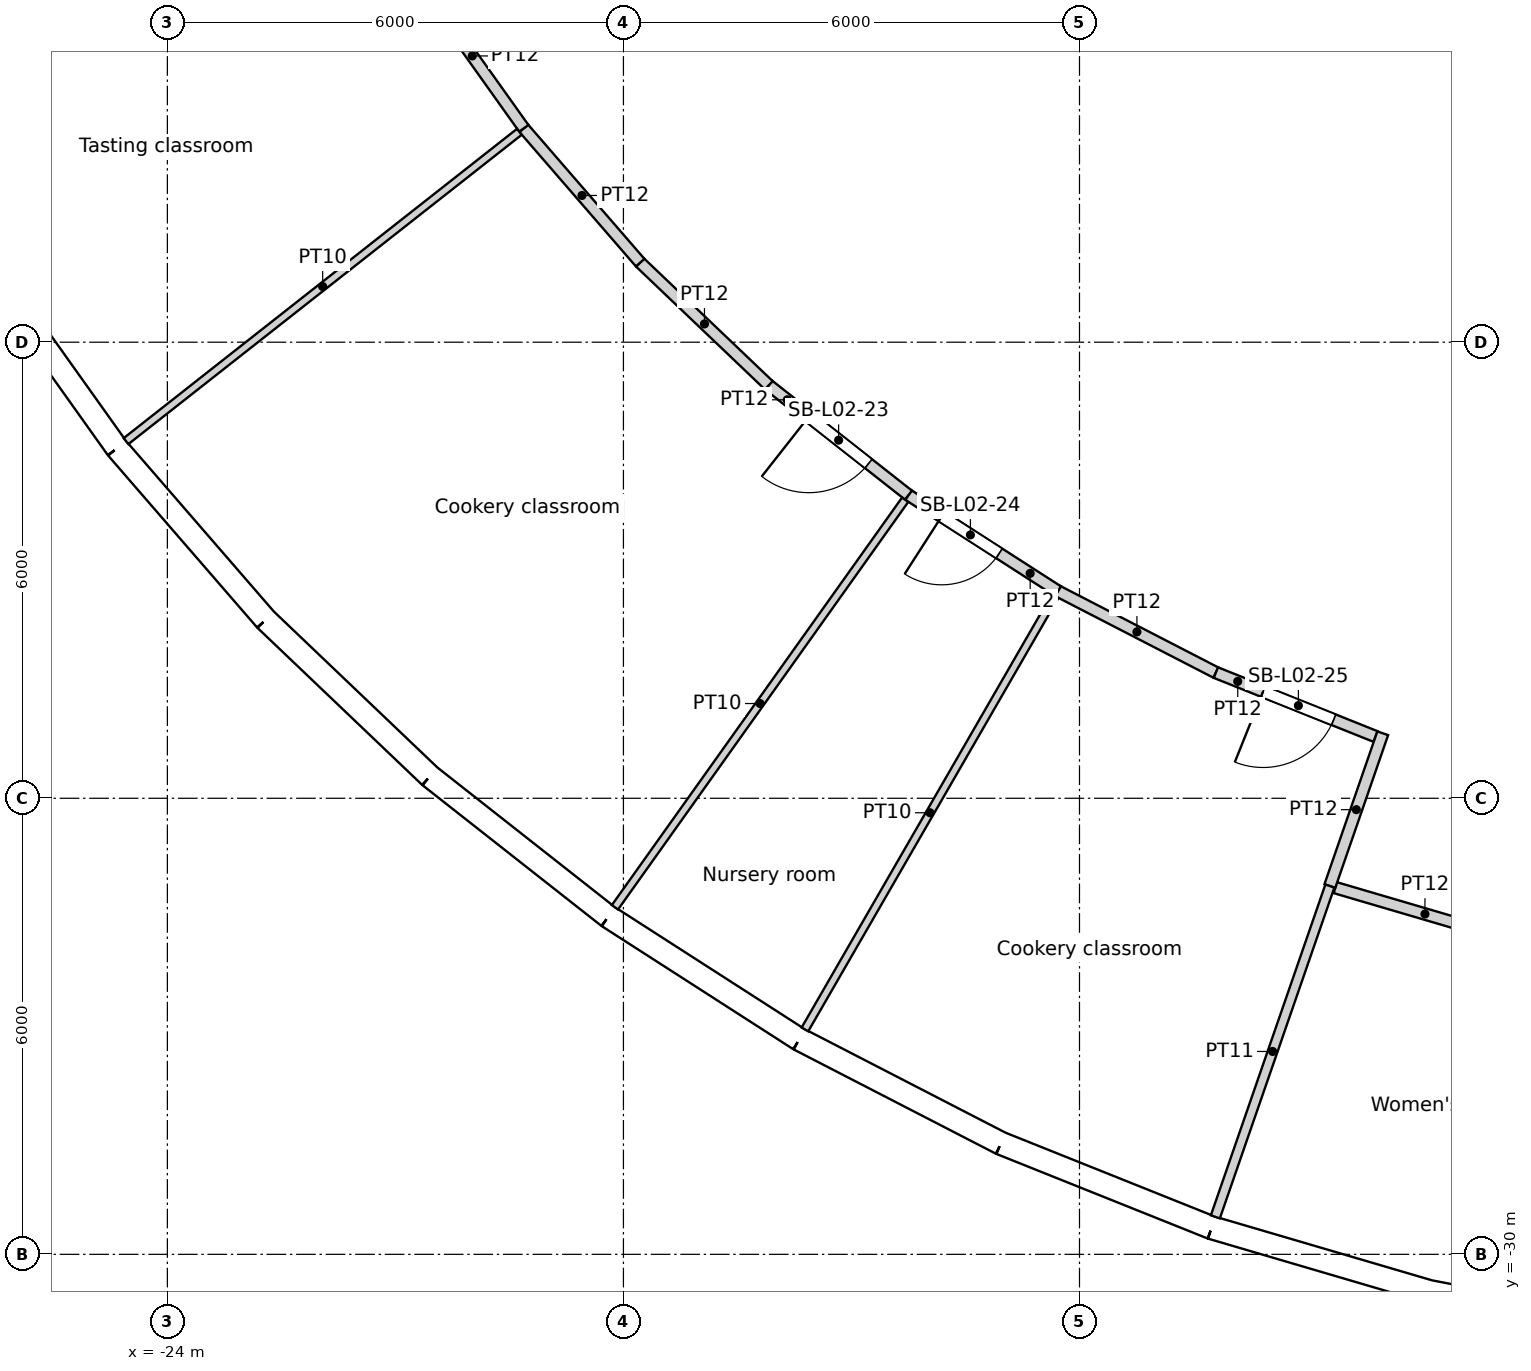
"""IFC4 building model, lengths in metres.
Left out: names, types, materials, properties, quantities, classifications, styles, units other than length and angle.
Written with IfcOpenShell. Run it as: python <this file> out.ifc"""

import sys

from ifc_helpers import new_model, si_unit, direction, frame, frame_2d, origin, origin_2d, place, context, subcontext, project, spatial, rectangle, circle, extrude, element, fill, save


model = new_model("IFC4")
c1 = context("Model", 3, precision=1e-05, world=origin(), true_north=direction((0.0, 1.0)))
c2 = subcontext(c1, "Body", "Model", "MODEL_VIEW")
j1 = project(units=[si_unit("LENGTHUNIT", "METRE"), si_unit("PLANEANGLEUNIT", "RADIAN")], contexts=[c1])
p1 = place(None, origin())
s1 = spatial("IfcSite", under=j1, at=p1, CompositionType="ELEMENT")
p2 = place(p1, origin())
s2 = spatial("IfcBuilding", under=s1, at=p2, CompositionType="ELEMENT")
p3 = place(p2, frame((0.0, 0.0, 13.8)))
s3 = spatial("IfcBuildingStorey", under=s2, at=p3, CompositionType="ELEMENT", Elevation=13.8)
for number, where, z_axis, x_axis in (
    (1, (-23.797, -18.715, 0.0), (0.0, 0.0, 1.0), (1.0, 0.0, 0.0)),
    (2, (-19.826, -22.88, 0.0), (0.0, 0.0, 1.0), (1.0, 0.0, 0.0)),
    (3, (-15.137, -26.219, 0.0), (0.0, 0.0, 1.0), (1.0, 0.0, 0.0)),
    (4, (-9.902, -28.61, 0.0), (0.0, 0.0, 1.0), (1.0, 0.0, 0.0)),
):
    element("IfcColumn", number, at=place(p3, frame(where, z_axis=z_axis, x_axis=x_axis)), inside=s3, PredefinedType="COLUMN", context=c2, shape_type="SweptSolid", body=[
        extrude(circle(Radius=0.7, at=origin_2d()), origin(), (0.0, 0.0, 1.0), 4.8),
    ])
for number, where, z_axis, x_axis in (
    (5, (-20.509, -13.489, 0.0), (0.0, 0.0, 1.0), (1.0, 0.0, 0.0)),
    (6, (-16.846, -17.855, 0.0), (0.0, 0.0, 1.0), (1.0, 0.0, 0.0)),
    (7, (-12.274, -21.259, 0.0), (0.0, 0.0, 1.0), (1.0, 0.0, 0.0)),
    (8, (-7.04, -23.516, 0.0), (0.0, 0.0, 1.0), (1.0, 0.0, 0.0)),
):
    element("IfcColumn", number, at=place(p3, frame(where, z_axis=z_axis, x_axis=x_axis)), inside=s3, PredefinedType="COLUMN", context=c2, shape_type="SweptSolid", body=[
        extrude(circle(Radius=0.75, at=origin_2d()), origin(), (0.0, 0.0, 1.0), 4.8),
    ])
p4 = place(p3, frame((-9.411, -16.301, 0.0), z_axis=(0.0, 0.0, 1.0), x_axis=(1.0, 0.0, 0.0)))
e9 = element("IfcColumn", 9, at=p4, inside=s3, PredefinedType="COLUMN", context=c2, shape_type="SweptSolid", body=[
    extrude(circle(Radius=0.8, at=origin_2d()), origin(), (0.0, 0.0, 1.0), 4.8),
])
p5 = place(p3, frame((-26.394, -16.962, 0.0), z_axis=(0.0, 0.0, 1.0), x_axis=(0.580100533892, -0.814544885551, 0.0)))
e10 = element("IfcWall", 10, at=p5, inside=s3, PredefinedType="SOLIDWALL", context=c2, shape_type="SweptSolid", body=[
    extrude(rectangle(XDim=2.986, YDim=0.3, at=frame_2d((1.493, 0.0))), origin(), (0.0, 0.0, 1.0), 4.35),
])
p6 = place(p5, frame((1.493, 0.0, 2.0)))
e11 = element("IfcOpeningElement", 11, at=p6, cuts=e10, PredefinedType="OPENING", context=c2, shape_type="SweptSolid", body=[
    extrude(circle(Radius=1.2, at=origin_2d()), frame((0.0, 0.16, 0.0), z_axis=(0.0, -1.0, 0.0), x_axis=(1.0, 0.0, 0.0)), (0.0, 0.0, 1.0), 0.32),
])
p7 = place(p3, frame((-24.662, -19.394, 0.0), z_axis=(0.0, 0.0, 1.0), x_axis=(0.654809121128, -0.755794294029, 0.0)))
e12 = element("IfcWall", 12, at=p7, inside=s3, PredefinedType="SOLIDWALL", context=c2, shape_type="SweptSolid", body=[
    extrude(rectangle(XDim=2.986, YDim=0.3, at=frame_2d((1.493, 0.0))), origin(), (0.0, 0.0, 1.0), 4.35),
])
p8 = place(p7, frame((1.493, 0.0, 2.0)))
e13 = element("IfcOpeningElement", 13, at=p8, cuts=e12, PredefinedType="OPENING", context=c2, shape_type="SweptSolid", body=[
    extrude(circle(Radius=1.2, at=origin_2d()), frame((0.0, 0.16, 0.0), z_axis=(0.0, -1.0, 0.0), x_axis=(1.0, 0.0, 0.0)), (0.0, 0.0, 1.0), 0.32),
])
p9 = place(p3, frame((-22.707, -21.651, 0.0), z_axis=(0.0, 0.0, 1.0), x_axis=(0.723750841228, -0.690061388444, 0.0)))
e14 = element("IfcWall", 14, at=p9, inside=s3, PredefinedType="SOLIDWALL", context=c2, shape_type="SweptSolid", body=[
    extrude(rectangle(XDim=2.986, YDim=0.3, at=frame_2d((1.493, 0.0))), origin(), (0.0, 0.0, 1.0), 4.35),
])
p10 = place(p9, frame((1.493, 0.0, 2.0)))
e15 = element("IfcOpeningElement", 15, at=p10, cuts=e14, PredefinedType="OPENING", context=c2, shape_type="SweptSolid", body=[
    extrude(circle(Radius=1.2, at=origin_2d()), frame((0.0, 0.16, 0.0), z_axis=(0.0, -1.0, 0.0), x_axis=(1.0, 0.0, 0.0)), (0.0, 0.0, 1.0), 0.32),
])
p11 = place(p3, frame((-20.546, -23.711, 0.0), z_axis=(0.0, 0.0, 1.0), x_axis=(0.786043032847, -0.618171780747, 0.0)))
e16 = element("IfcWall", 16, at=p11, inside=s3, PredefinedType="SOLIDWALL", context=c2, shape_type="SweptSolid", body=[
    extrude(rectangle(XDim=2.986, YDim=0.3, at=frame_2d((1.493, 0.0))), origin(), (0.0, 0.0, 1.0), 4.35),
])
p12 = place(p11, frame((1.493, 0.0, 2.0)))
e17 = element("IfcOpeningElement", 17, at=p12, cuts=e16, PredefinedType="OPENING", context=c2, shape_type="SweptSolid", body=[
    extrude(circle(Radius=1.2, at=origin_2d()), frame((0.0, 0.16, 0.0), z_axis=(0.0, -1.0, 0.0), x_axis=(1.0, 0.0, 0.0)), (0.0, 0.0, 1.0), 0.32),
])
p13 = place(p3, frame((-18.199, -25.557, 0.0), z_axis=(0.0, 0.0, 1.0), x_axis=(0.841242231846, -0.540658401727, 0.0)))
e18 = element("IfcWall", 18, at=p13, inside=s3, PredefinedType="SOLIDWALL", context=c2, shape_type="SweptSolid", body=[
    extrude(rectangle(XDim=2.986, YDim=0.3, at=frame_2d((1.493, 0.0))), origin(), (0.0, 0.0, 1.0), 4.35),
])
p14 = place(p13, frame((1.493, 0.0, 2.0)))
e19 = element("IfcOpeningElement", 19, at=p14, cuts=e18, PredefinedType="OPENING", context=c2, shape_type="SweptSolid", body=[
    extrude(circle(Radius=1.2, at=origin_2d()), frame((0.0, 0.16, 0.0), z_axis=(0.0, -1.0, 0.0), x_axis=(1.0, 0.0, 0.0)), (0.0, 0.0, 1.0), 0.32),
])
p15 = place(p3, frame((-15.687, -27.171, 0.0), z_axis=(0.0, 0.0, 1.0), x_axis=(0.888831268481, -0.458234630043, 0.0)))
e20 = element("IfcWall", 20, at=p15, inside=s3, PredefinedType="SOLIDWALL", context=c2, shape_type="SweptSolid", body=[
    extrude(rectangle(XDim=2.986, YDim=0.3, at=frame_2d((1.493, 0.0))), origin(), (0.0, 0.0, 1.0), 4.35),
])
p16 = place(p15, frame((1.493, 0.0, 2.0)))
e21 = element("IfcOpeningElement", 21, at=p16, cuts=e20, PredefinedType="OPENING", context=c2, shape_type="SweptSolid", body=[
    extrude(circle(Radius=1.2, at=origin_2d()), frame((0.0, 0.16, 0.0), z_axis=(0.0, -1.0, 0.0), x_axis=(1.0, 0.0, 0.0)), (0.0, 0.0, 1.0), 0.32),
])
p17 = place(p3, frame((-13.033, -28.539, 0.0), z_axis=(0.0, 0.0, 1.0), x_axis=(0.928380795373, -0.371630325434, 0.0)))
e22 = element("IfcWall", 22, at=p17, inside=s3, PredefinedType="SOLIDWALL", context=c2, shape_type="SweptSolid", body=[
    extrude(rectangle(XDim=2.986, YDim=0.3, at=frame_2d((1.493, 0.0))), origin(), (0.0, 0.0, 1.0), 4.35),
])
p18 = place(p17, frame((1.493, 0.0, 2.0)))
e23 = element("IfcOpeningElement", 23, at=p18, cuts=e22, PredefinedType="OPENING", context=c2, shape_type="SweptSolid", body=[
    extrude(circle(Radius=1.2, at=origin_2d()), frame((0.0, 0.16, 0.0), z_axis=(0.0, -1.0, 0.0), x_axis=(1.0, 0.0, 0.0)), (0.0, 0.0, 1.0), 0.32),
])
p19 = place(p3, frame((-10.261, -29.649, 0.0), z_axis=(0.0, 0.0, 1.0), x_axis=(0.959502108153, -0.281701445593, 0.0)))
e24 = element("IfcWall", 24, at=p19, inside=s3, PredefinedType="SOLIDWALL", context=c2, shape_type="SweptSolid", body=[
    extrude(rectangle(XDim=2.986, YDim=0.3, at=frame_2d((1.493, 0.0))), origin(), (0.0, 0.0, 1.0), 4.35),
])
p20 = place(p19, frame((1.493, 0.0, 2.0)))
e25 = element("IfcOpeningElement", 25, at=p20, cuts=e24, PredefinedType="OPENING", context=c2, shape_type="SweptSolid", body=[
    extrude(circle(Radius=1.2, at=origin_2d()), frame((0.0, 0.16, 0.0), z_axis=(0.0, -1.0, 0.0), x_axis=(1.0, 0.0, 0.0)), (0.0, 0.0, 1.0), 0.32),
])
p21 = place(p3, frame((-7.397, -30.49, 0.0), z_axis=(0.0, 0.0, 1.0), x_axis=(0.981918853666, -0.189302310646, 0.0)))
e26 = element("IfcWall", 26, at=p21, inside=s3, PredefinedType="SOLIDWALL", context=c2, shape_type="SweptSolid", body=[
    extrude(rectangle(XDim=2.986, YDim=0.3, at=frame_2d((1.493, 0.0))), origin(), (0.0, 0.0, 1.0), 4.35),
])
p22 = place(p21, frame((1.493, 0.0, 2.0)))
e27 = element("IfcOpeningElement", 27, at=p22, cuts=e26, PredefinedType="OPENING", context=c2, shape_type="SweptSolid", body=[
    extrude(circle(Radius=1.2, at=origin_2d()), frame((0.0, 0.16, 0.0), z_axis=(0.0, -1.0, 0.0), x_axis=(1.0, 0.0, 0.0)), (0.0, 0.0, 1.0), 0.32),
])
p23 = place(p3, frame((-27.753, -14.308, 0.0), z_axis=(0.0, 0.0, 1.0), x_axis=(0.888828839168, 0.458239342117, 0.0)))
e28 = element("IfcWall", 28, at=p23, inside=s3, PredefinedType="PARTITIONING", context=c2, shape_type="SweptSolid", body=[
    extrude(rectangle(XDim=6.658, YDim=0.1, at=frame_2d((3.329, 0.0))), origin(), (0.0, 0.0, 1.0), 3.75),
])
p24 = place(p3, frame((-24.544, -19.302, 0.0), z_axis=(0.0, 0.0, 1.0), x_axis=(0.786055722677, 0.618155644515, 0.0)))
e29 = element("IfcWall", 29, at=p24, inside=s3, PredefinedType="PARTITIONING", context=c2, shape_type="SweptSolid", body=[
    extrude(rectangle(XDim=6.583, YDim=0.1, at=frame_2d((3.291, 0.0))), origin(), (0.0, 0.0, 1.0), 3.75),
])
p25 = place(p3, frame((-20.667, -13.282, 0.0), z_axis=(0.0, 0.0, 1.0), x_axis=(0.580032319147, -0.814593462252, 0.0)))
e30 = element("IfcWall", 30, at=p25, inside=s3, PredefinedType="PARTITIONING", context=c2, shape_type="SweptSolid", body=[
    extrude(rectangle(XDim=2.338, YDim=0.15, at=frame_2d((1.169, 0.0))), origin(), (0.0, 0.0, 1.0), 3.75),
])
p26 = place(p3, frame((-19.311, -15.186, 0.0), z_axis=(0.0, 0.0, 1.0), x_axis=(0.654866925236, -0.755744209526, 0.0)))
e31 = element("IfcWall", 31, at=p26, inside=s3, PredefinedType="PARTITIONING", context=c2, shape_type="SweptSolid", body=[
    extrude(rectangle(XDim=2.338, YDim=0.15, at=frame_2d((1.169, 0.0))), origin(), (0.0, 0.0, 1.0), 3.75),
])
p27 = place(p3, frame((-18.112, -25.435, 0.0), z_axis=(0.0, 0.0, 1.0), x_axis=(0.580055201519, 0.814577168346, 0.0)))
e32 = element("IfcWall", 32, at=p27, inside=s3, PredefinedType="PARTITIONING", context=c2, shape_type="SweptSolid", body=[
    extrude(rectangle(XDim=6.582, YDim=0.1, at=frame_2d((3.291, 0.0))), origin(), (0.0, 0.0, 1.0), 3.75),
])
p28 = place(p3, frame((-17.78, -16.953, 0.0), z_axis=(0.0, 0.0, 1.0), x_axis=(0.723668407542, -0.690147836283, 0.0)))
e33 = element("IfcWall", 33, at=p28, inside=s3, PredefinedType="PARTITIONING", context=c2, shape_type="SweptSolid", body=[
    extrude(rectangle(XDim=2.338, YDim=0.15, at=frame_2d((1.169, 0.0))), origin(), (0.0, 0.0, 1.0), 3.75),
])
p29 = place(p3, frame((-14.25, -20.011, 0.0), z_axis=(0.0, 0.0, 1.0), x_axis=(-0.786108126536, 0.618089001191, 0.0)))
e34 = element("IfcWall", 34, at=p29, inside=s3, PredefinedType="PARTITIONING", context=c2, shape_type="SweptSolid", body=[
    extrude(rectangle(XDim=2.338, YDim=0.15, at=frame_2d((1.169, 0.0))), origin(), (0.0, 0.0, 1.0), 3.75),
])
p30 = place(p29, frame((0.669, 0.0, 0.0)))
e35 = element("IfcOpeningElement", 35, at=p30, cuts=e34, PredefinedType="OPENING", context=c2, shape_type="SweptSolid", body=[
    extrude(rectangle(XDim=1.0, YDim=2.1, at=frame_2d((0.5, 1.05))), frame((0.0, 0.075, 0.0), z_axis=(0.0, -1.0, 0.0), x_axis=(1.0, 0.0, 0.0)), (0.0, 0.0, 1.0), 0.15),
])
p31 = place(p3, frame((-15.612, -27.041, 0.0), z_axis=(0.0, 0.0, 1.0), x_axis=(0.499996417602, 0.866027472073, 0.0)))
e36 = element("IfcWall", 36, at=p31, inside=s3, PredefinedType="PARTITIONING", context=c2, shape_type="SweptSolid", body=[
    extrude(rectangle(XDim=6.583, YDim=0.1, at=frame_2d((3.291, 0.0))), origin(), (0.0, 0.0, 1.0), 3.75),
])
p32 = place(p3, frame((-12.283, -21.275, 0.0), z_axis=(0.0, 0.0, 1.0), x_axis=(-0.841236155743, 0.540667855777, 0.0)))
e37 = element("IfcWall", 37, at=p32, inside=s3, PredefinedType="PARTITIONING", context=c2, shape_type="SweptSolid", body=[
    extrude(rectangle(XDim=2.338, YDim=0.15, at=frame_2d((1.169, 0.0))), origin(), (0.0, 0.0, 1.0), 3.75),
])
p33 = place(p32, frame((0.919, 0.0, 0.0)))
e38 = element("IfcOpeningElement", 38, at=p33, cuts=e37, PredefinedType="OPENING", context=c2, shape_type="SweptSolid", body=[
    extrude(rectangle(XDim=0.9, YDim=2.1, at=frame_2d((0.45, 1.05))), frame((0.0, 0.075, 0.0), z_axis=(0.0, -1.0, 0.0), x_axis=(1.0, 0.0, 0.0)), (0.0, 0.0, 1.0), 0.15),
])
p34 = place(p3, frame((-12.283, -21.275, 0.0), z_axis=(0.0, 0.0, 1.0), x_axis=(0.888845697941, -0.458206640339, 0.0)))
e39 = element("IfcWall", 39, at=p34, inside=s3, PredefinedType="PARTITIONING", context=c2, shape_type="SweptSolid", body=[
    extrude(rectangle(XDim=2.338, YDim=0.15, at=frame_2d((1.169, 0.0))), origin(), (0.0, 0.0, 1.0), 3.75),
])
p35 = place(p3, frame((-10.212, -29.507, 0.0), z_axis=(0.0, 0.0, 1.0), x_axis=(0.327037731194, 0.945011281613, 0.0)))
e40 = element("IfcWall", 40, at=p35, inside=s3, PredefinedType="PARTITIONING", context=c2, shape_type="SweptSolid", body=[
    extrude(rectangle(XDim=4.605, YDim=0.125, at=frame_2d((2.303, 0.0))), origin(), (0.0, 0.0, 1.0), 3.75),
])
p36 = place(p3, frame((-8.104, -23.188, 0.0), z_axis=(0.0, 0.0, 1.0), x_axis=(-0.928365042032, 0.371669676909, 0.0)))
e41 = element("IfcWall", 41, at=p36, inside=s3, PredefinedType="PARTITIONING", context=c2, shape_type="SweptSolid", body=[
    extrude(rectangle(XDim=2.263, YDim=0.15, at=frame_2d((1.131, 0.0))), origin(), (0.0, 0.0, 1.0), 3.75),
])
p37 = place(p36, frame((0.594, 0.0, 0.0)))
e42 = element("IfcOpeningElement", 42, at=p37, cuts=e41, PredefinedType="OPENING", context=c2, shape_type="SweptSolid", body=[
    extrude(rectangle(XDim=1.0, YDim=2.1, at=frame_2d((0.5, 1.05))), frame((0.0, 0.075, 0.0), z_axis=(0.0, -1.0, 0.0), x_axis=(1.0, 0.0, 0.0)), (0.0, 0.0, 1.0), 0.15),
])
p38 = place(p3, frame((-8.706, -25.155, 0.0), z_axis=(0.0, 0.0, 1.0), x_axis=(0.327086912916, 0.944994259982, 0.0)))
e43 = element("IfcWall", 43, at=p38, inside=s3, PredefinedType="PARTITIONING", context=c2, shape_type="SweptSolid", body=[
    extrude(rectangle(XDim=2.127, YDim=0.15, at=frame_2d((1.063, 0.0))), origin(), (0.0, 0.0, 1.0), 3.75),
])
p39 = place(p3, frame((-8.634, -25.176, 0.0), z_axis=(0.0, 0.0, 1.0), x_axis=(0.959512450636, -0.281666215713, 0.0)))
e44 = element("IfcWall", 44, at=p39, inside=s3, PredefinedType="PARTITIONING", context=c2, shape_type="SweptSolid", body=[
    extrude(rectangle(XDim=2.458, YDim=0.15, at=frame_2d((1.229, 0.0))), origin(), (0.0, 0.0, 1.0), 3.75),
])
p40 = place(p6, origin())
e45 = element("IfcWindow", 45, at=p40, inside=s3, PartitioningType="SINGLE_PANEL", PredefinedType="WINDOW", context=c2, shape_type="SweptSolid", body=[
    extrude(circle(Radius=1.2, at=origin_2d()), frame((0.0, 0.12, 0.0), z_axis=(0.0, -1.0, 0.0), x_axis=(1.0, 0.0, 0.0)), (0.0, 0.0, 1.0), 0.1),
])
fill(e11, e45)
p41 = place(p8, origin())
e46 = element("IfcWindow", 46, at=p41, inside=s3, PartitioningType="SINGLE_PANEL", PredefinedType="WINDOW", context=c2, shape_type="SweptSolid", body=[
    extrude(circle(Radius=1.2, at=origin_2d()), frame((0.0, 0.12, 0.0), z_axis=(0.0, -1.0, 0.0), x_axis=(1.0, 0.0, 0.0)), (0.0, 0.0, 1.0), 0.1),
])
fill(e13, e46)
p42 = place(p10, origin())
e47 = element("IfcWindow", 47, at=p42, inside=s3, PartitioningType="SINGLE_PANEL", PredefinedType="WINDOW", context=c2, shape_type="SweptSolid", body=[
    extrude(circle(Radius=1.2, at=origin_2d()), frame((0.0, 0.12, 0.0), z_axis=(0.0, -1.0, 0.0), x_axis=(1.0, 0.0, 0.0)), (0.0, 0.0, 1.0), 0.1),
])
fill(e15, e47)
p43 = place(p12, origin())
e48 = element("IfcWindow", 48, at=p43, inside=s3, PartitioningType="SINGLE_PANEL", PredefinedType="WINDOW", context=c2, shape_type="SweptSolid", body=[
    extrude(circle(Radius=1.2, at=origin_2d()), frame((0.0, 0.12, 0.0), z_axis=(0.0, -1.0, 0.0), x_axis=(1.0, 0.0, 0.0)), (0.0, 0.0, 1.0), 0.1),
])
fill(e17, e48)
p44 = place(p14, origin())
e49 = element("IfcWindow", 49, at=p44, inside=s3, PartitioningType="SINGLE_PANEL", PredefinedType="WINDOW", context=c2, shape_type="SweptSolid", body=[
    extrude(circle(Radius=1.2, at=origin_2d()), frame((0.0, 0.12, 0.0), z_axis=(0.0, -1.0, 0.0), x_axis=(1.0, 0.0, 0.0)), (0.0, 0.0, 1.0), 0.1),
])
fill(e19, e49)
p45 = place(p16, origin())
e50 = element("IfcWindow", 50, at=p45, inside=s3, PartitioningType="SINGLE_PANEL", PredefinedType="WINDOW", context=c2, shape_type="SweptSolid", body=[
    extrude(circle(Radius=1.2, at=origin_2d()), frame((0.0, 0.12, 0.0), z_axis=(0.0, -1.0, 0.0), x_axis=(1.0, 0.0, 0.0)), (0.0, 0.0, 1.0), 0.1),
])
fill(e21, e50)
p46 = place(p18, origin())
e51 = element("IfcWindow", 51, at=p46, inside=s3, PartitioningType="SINGLE_PANEL", PredefinedType="WINDOW", context=c2, shape_type="SweptSolid", body=[
    extrude(circle(Radius=1.2, at=origin_2d()), frame((0.0, 0.12, 0.0), z_axis=(0.0, -1.0, 0.0), x_axis=(1.0, 0.0, 0.0)), (0.0, 0.0, 1.0), 0.1),
])
fill(e23, e51)
p47 = place(p20, origin())
e52 = element("IfcWindow", 52, at=p47, inside=s3, PartitioningType="SINGLE_PANEL", PredefinedType="WINDOW", context=c2, shape_type="SweptSolid", body=[
    extrude(circle(Radius=1.2, at=origin_2d()), frame((0.0, 0.12, 0.0), z_axis=(0.0, -1.0, 0.0), x_axis=(1.0, 0.0, 0.0)), (0.0, 0.0, 1.0), 0.1),
])
fill(e25, e52)
p48 = place(p30, origin())
e53 = element("IfcDoor", 53, at=p48, inside=s3, OperationType="SINGLE_SWING_RIGHT", PredefinedType="DOOR", context=c2, shape_type="SweptSolid", body=[
    extrude(rectangle(XDim=1.0, YDim=2.1, at=frame_2d((0.5, 1.05))), frame((0.0, 0.025, 0.0), z_axis=(0.0, -1.0, 0.0), x_axis=(1.0, 0.0, 0.0)), (0.0, 0.0, 1.0), 0.05),
])
fill(e35, e53)
p49 = place(p33, origin())
e54 = element("IfcDoor", 54, at=p49, inside=s3, OperationType="SINGLE_SWING_RIGHT", PredefinedType="DOOR", context=c2, shape_type="SweptSolid", body=[
    extrude(rectangle(XDim=0.9, YDim=2.1, at=frame_2d((0.45, 1.05))), frame((0.0, 0.025, 0.0), z_axis=(0.0, -1.0, 0.0), x_axis=(1.0, 0.0, 0.0)), (0.0, 0.0, 1.0), 0.05),
])
fill(e38, e54)
p50 = place(p37, origin())
e55 = element("IfcDoor", 55, at=p50, inside=s3, OperationType="SINGLE_SWING_RIGHT", PredefinedType="DOOR", context=c2, shape_type="SweptSolid", body=[
    extrude(rectangle(XDim=1.0, YDim=2.1, at=frame_2d((0.5, 1.05))), frame((0.0, 0.025, 0.0), z_axis=(0.0, -1.0, 0.0), x_axis=(1.0, 0.0, 0.0)), (0.0, 0.0, 1.0), 0.05),
])
fill(e42, e55)
save(model, sys.argv[1])
